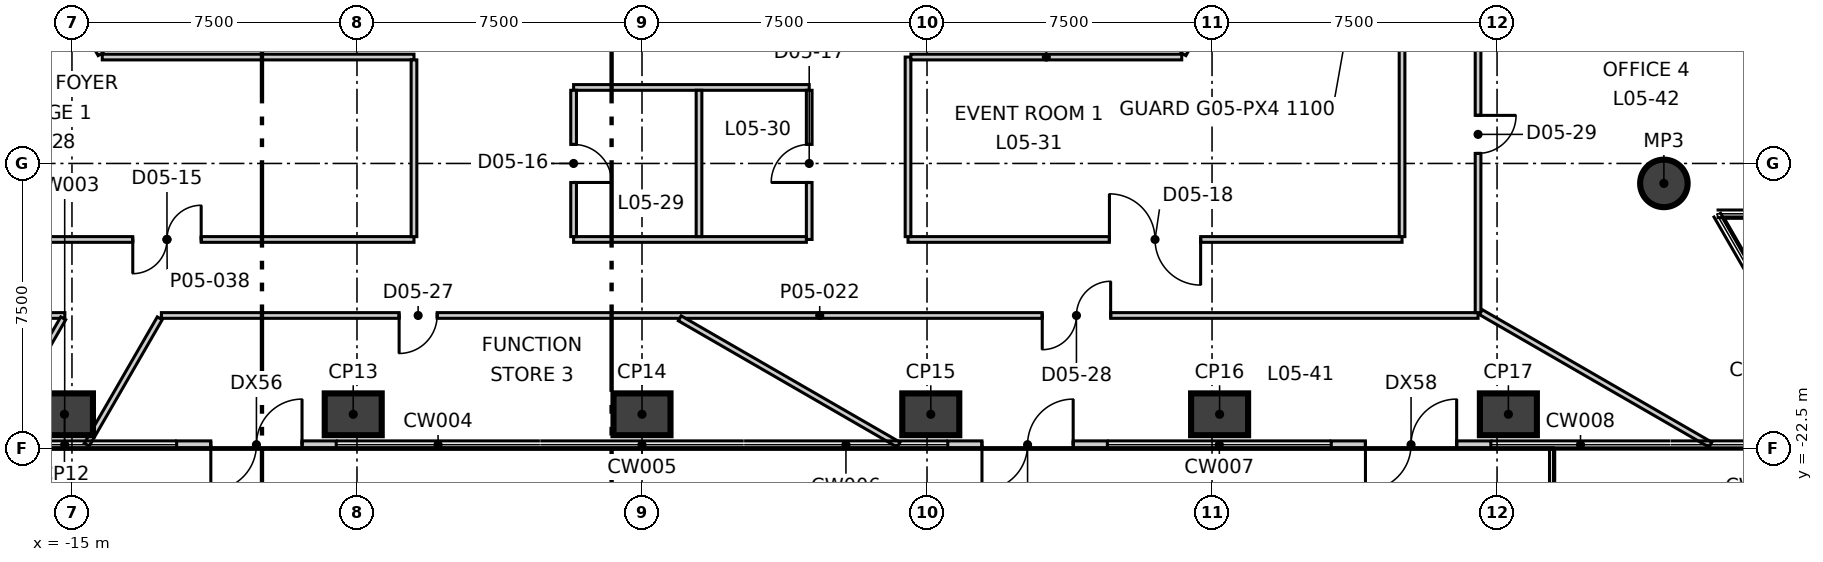
"""IFC4 building model, lengths in metres.
Left out: names, types, materials, properties, quantities, classifications, styles, units other than length and angle.
Written with IfcOpenShell. Run it as: python <this file> out.ifc"""

import sys

from ifc_helpers import new_model, si_unit, direction, frame, frame_2d, origin, origin_2d, place, context, subcontext, project, spatial, rectangle, circle, extrude, element, fill, save


model = new_model("IFC4")
c1 = context("Model", 3, precision=1e-05, world=origin(), true_north=direction((0.0, 1.0)))
c2 = subcontext(c1, "Body", "Model", "MODEL_VIEW")
j1 = project(units=[si_unit("LENGTHUNIT", "METRE"), si_unit("PLANEANGLEUNIT", "RADIAN")], contexts=[c1])
p1 = place(None, origin())
s1 = spatial("IfcSite", under=j1, at=p1, CompositionType="ELEMENT")
p2 = place(p1, origin())
s2 = spatial("IfcBuilding", under=s1, at=p2, CompositionType="ELEMENT")
p3 = place(p2, frame((0.0, 0.0, 30.3)))
s3 = spatial("IfcBuildingStorey", under=s2, at=p3, CompositionType="ELEMENT", Elevation=30.3)
for number, where, z_axis, x_axis in (
    (1, (-15.198, -21.6, -0.4), (0.0, 0.0, 1.0), (1.0, 0.0, 0.0)),
    (2, (-7.599, -21.6, -0.4), (0.0, 0.0, 1.0), (1.0, 0.0, 0.0)),
    (3, (0.0, -21.6, -0.4), (0.0, 0.0, 1.0), (1.0, 0.0, 0.0)),
    (4, (7.599, -21.6, -0.4), (0.0, 0.0, 1.0), (1.0, 0.0, 0.0)),
    (5, (15.199, -21.6, -0.4), (0.0, 0.0, 1.0), (1.0, 0.0, 0.0)),
    (6, (22.798, -21.6, -0.4), (0.0, 0.0, 1.0), (1.0, 0.0, 0.0)),
):
    element("IfcColumn", number, at=place(p3, frame(where, z_axis=z_axis, x_axis=x_axis)), inside=s3, PredefinedType="COLUMN", context=c2, shape_type="SweptSolid", body=[
        extrude(rectangle(XDim=1.5, YDim=1.1, at=origin_2d()), origin(), (0.0, 0.0, 1.0), 5.1),
    ])
p4 = place(p3, frame((26.89, -15.525, -0.4), z_axis=(0.0, 0.0, 1.0), x_axis=(1.0, 0.0, 0.0)))
e7 = element("IfcColumn", 7, at=p4, inside=s3, PredefinedType="COLUMN", context=c2, shape_type="SweptSolid", body=[
    extrude(circle(Radius=0.625, at=origin_2d()), origin(), (0.0, 0.0, 1.0), 5.1),
])
p5 = place(p3, frame((-12.246, -22.4, 0.0), z_axis=(0.0, 0.0, 1.0), x_axis=(1.0, 0.0, 0.0)))
e8 = element("IfcWall", 8, at=p5, inside=s3, PredefinedType="ELEMENTEDWALL", context=c2, shape_type="SweptSolid", body=[
    extrude(rectangle(XDim=4.2, YDim=0.2, at=frame_2d((2.1, 0.0))), origin(), (0.0, 0.0, 1.0), 4.7),
])
p6 = place(p5, frame((0.9, 0.0, 0.0)))
e9 = element("IfcOpeningElement", 9, at=p6, cuts=e8, PredefinedType="OPENING", context=c2, shape_type="SweptSolid", body=[
    extrude(rectangle(XDim=2.4, YDim=2.4, at=frame_2d((1.2, 1.2))), frame((0.0, 0.11, 0.0), z_axis=(0.0, -1.0, 0.0), x_axis=(1.0, 0.0, 0.0)), (0.0, 0.0, 1.0), 0.22),
])
p7 = place(p3, frame((8.046, -22.4, 0.0), z_axis=(0.0, 0.0, 1.0), x_axis=(1.0, 0.0, 0.0)))
e10 = element("IfcWall", 10, at=p7, inside=s3, PredefinedType="ELEMENTEDWALL", context=c2, shape_type="SweptSolid", body=[
    extrude(rectangle(XDim=4.2, YDim=0.2, at=frame_2d((2.1, 0.0))), origin(), (0.0, 0.0, 1.0), 4.7),
])
p8 = place(p7, frame((0.9, 0.0, 0.0)))
e11 = element("IfcOpeningElement", 11, at=p8, cuts=e10, PredefinedType="OPENING", context=c2, shape_type="SweptSolid", body=[
    extrude(rectangle(XDim=2.4, YDim=2.4, at=frame_2d((1.2, 1.2))), frame((0.0, 0.11, 0.0), z_axis=(0.0, -1.0, 0.0), x_axis=(1.0, 0.0, 0.0)), (0.0, 0.0, 1.0), 0.22),
])
p9 = place(p3, frame((18.137, -22.4, 0.0), z_axis=(0.0, 0.0, 1.0), x_axis=(1.0, 0.0, 0.0)))
e12 = element("IfcWall", 12, at=p9, inside=s3, PredefinedType="ELEMENTEDWALL", context=c2, shape_type="SweptSolid", body=[
    extrude(rectangle(XDim=4.2, YDim=0.2, at=frame_2d((2.1, 0.0))), origin(), (0.0, 0.0, 1.0), 4.7),
])
p10 = place(p9, frame((0.9, 0.0, 0.0)))
e13 = element("IfcOpeningElement", 13, at=p10, cuts=e12, PredefinedType="OPENING", context=c2, shape_type="SweptSolid", body=[
    extrude(rectangle(XDim=2.4, YDim=2.4, at=frame_2d((1.2, 1.2))), frame((0.0, 0.11, 0.0), z_axis=(0.0, -1.0, 0.0), x_axis=(1.0, 0.0, 0.0)), (0.0, 0.0, 1.0), 0.22),
])
p11 = place(p3, frame((-20.925, -19.0, 0.0), z_axis=(0.0, 0.0, 1.0), x_axis=(1.0, 0.0, 0.0)))
e14 = element("IfcWall", 14, at=p11, inside=s3, PredefinedType="PARTITIONING", context=c2, shape_type="SweptSolid", body=[
    extrude(rectangle(XDim=5.738, YDim=0.15, at=frame_2d((2.869, 0.0))), origin(), (0.0, 0.0, 1.0), 4.7),
])
p12 = place(p3, frame((-12.647, -19.0, 0.0), z_axis=(0.0, 0.0, 1.0), x_axis=(1.0, 0.0, 0.0)))
e15 = element("IfcWall", 15, at=p12, inside=s3, PredefinedType="PARTITIONING", context=c2, shape_type="SweptSolid", body=[
    extrude(rectangle(XDim=34.647, YDim=0.15, at=frame_2d((17.323, 0.0))), origin(), (0.0, 0.0, 1.0), 4.7),
])
p13 = place(p12, frame((6.256, 0.0, 0.0)))
e16 = element("IfcOpeningElement", 16, at=p13, cuts=e15, PredefinedType="OPENING", context=c2, shape_type="SweptSolid", body=[
    extrude(rectangle(XDim=1.0, YDim=2.1, at=frame_2d((0.5, 1.05))), frame((0.0, 0.085, 0.0), z_axis=(0.0, -1.0, 0.0), x_axis=(1.0, 0.0, 0.0)), (0.0, 0.0, 1.0), 0.17),
])
p14 = place(p12, frame((23.179, 0.0, 0.0)))
e17 = element("IfcOpeningElement", 17, at=p14, cuts=e15, PredefinedType="OPENING", context=c2, shape_type="SweptSolid", body=[
    extrude(rectangle(XDim=1.8, YDim=2.1, at=frame_2d((0.9, 1.05))), frame((0.0, 0.085, 0.0), z_axis=(0.0, -1.0, 0.0), x_axis=(1.0, 0.0, 0.0)), (0.0, 0.0, 1.0), 0.17),
])
p15 = place(p3, frame((-17.15, -22.4, 0.0), z_axis=(0.0, 0.0, 1.0), x_axis=(0.500050869834, 0.86599603208, 0.0)))
e18 = element("IfcWall", 18, at=p15, inside=s3, PredefinedType="PARTITIONING", context=c2, shape_type="SweptSolid", body=[
    extrude(rectangle(XDim=3.839, YDim=0.15, at=frame_2d((1.92, 0.0))), origin(), (0.0, 0.0, 1.0), 4.7),
])
p16 = place(p3, frame((-14.61, -22.4, 0.0), z_axis=(0.0, 0.0, 1.0), x_axis=(0.500098554833, 0.865968495648, 0.0)))
e19 = element("IfcWall", 19, at=p16, inside=s3, PredefinedType="PARTITIONING", context=c2, shape_type="SweptSolid", body=[
    extrude(rectangle(XDim=3.84, YDim=0.15, at=frame_2d((1.92, 0.0))), origin(), (0.0, 0.0, 1.0), 4.7),
])
p17 = place(p3, frame((22.0, -18.925, 0.0), z_axis=(0.0, 0.0, 1.0), x_axis=(0.0, 1.0, 0.0)))
e20 = element("IfcWall", 20, at=p17, inside=s3, PredefinedType="PARTITIONING", context=c2, shape_type="SweptSolid", body=[
    extrude(rectangle(XDim=9.325, YDim=0.15, at=frame_2d((4.663, 0.0))), origin(), (0.0, 0.0, 1.0), 4.7),
])
p18 = place(p17, frame((4.19, 0.0, 0.0)))
e21 = element("IfcOpeningElement", 21, at=p18, cuts=e20, PredefinedType="OPENING", context=c2, shape_type="SweptSolid", body=[
    extrude(rectangle(XDim=1.0, YDim=2.1, at=frame_2d((0.5, 1.05))), frame((0.0, 0.085, 0.0), z_axis=(0.0, -1.0, 0.0), x_axis=(1.0, 0.0, 0.0)), (0.0, 0.0, 1.0), 0.17),
])
p19 = place(p3, frame((0.994, -19.075, 0.0), z_axis=(0.0, 0.0, 1.0), x_axis=(0.866027239912, -0.49999681972, 0.0)))
e22 = element("IfcWall", 22, at=p19, inside=s3, PredefinedType="PARTITIONING", context=c2, shape_type="SweptSolid", body=[
    extrude(rectangle(XDim=6.65, YDim=0.15, at=frame_2d((3.325, 0.0))), origin(), (0.0, 0.0, 1.0), 4.7),
])
p20 = place(p3, frame((-1.8, -13.0, 0.0), z_axis=(0.0, 0.0, 1.0), x_axis=(1.0, 0.0, 0.0)))
e23 = element("IfcWall", 23, at=p20, inside=s3, PredefinedType="PARTITIONING", context=c2, shape_type="SweptSolid", body=[
    extrude(rectangle(XDim=6.2, YDim=0.15, at=frame_2d((3.1, 0.0))), origin(), (0.0, 0.0, 1.0), 4.7),
])
p21 = place(p3, frame((4.4, -17.0, 0.0), z_axis=(0.0, 0.0, 1.0), x_axis=(0.0, 1.0, 0.0)))
e24 = element("IfcWall", 24, at=p21, inside=s3, PredefinedType="PARTITIONING", context=c2, shape_type="SweptSolid", body=[
    extrude(rectangle(XDim=3.925, YDim=0.15, at=frame_2d((1.962, 0.0))), origin(), (0.0, 0.0, 1.0), 4.7),
])
p22 = place(p21, frame((1.5, 0.0, 0.0)))
e25 = element("IfcOpeningElement", 25, at=p22, cuts=e24, PredefinedType="OPENING", context=c2, shape_type="SweptSolid", body=[
    extrude(rectangle(XDim=1.0, YDim=2.1, at=frame_2d((0.5, 1.05))), frame((0.0, 0.085, 0.0), z_axis=(0.0, -1.0, 0.0), x_axis=(1.0, 0.0, 0.0)), (0.0, 0.0, 1.0), 0.17),
])
p23 = place(p3, frame((-19.0, -17.0, 0.0), z_axis=(0.0, 0.0, 1.0), x_axis=(1.0, 0.0, 0.0)))
e26 = element("IfcWall", 26, at=p23, inside=s3, PredefinedType="PARTITIONING", context=c2, shape_type="SweptSolid", body=[
    extrude(rectangle(XDim=13.0, YDim=0.15, at=frame_2d((6.5, 0.0))), origin(), (0.0, 0.0, 1.0), 4.7),
])
p24 = place(p23, frame((5.6, 0.0, 0.0)))
e27 = element("IfcOpeningElement", 27, at=p24, cuts=e26, PredefinedType="OPENING", context=c2, shape_type="SweptSolid", body=[
    extrude(rectangle(XDim=1.8, YDim=2.1, at=frame_2d((0.9, 1.05))), frame((0.0, 0.085, 0.0), z_axis=(0.0, -1.0, 0.0), x_axis=(1.0, 0.0, 0.0)), (0.0, 0.0, 1.0), 0.17),
])
p25 = place(p3, frame((-1.8, -17.0, 0.0), z_axis=(0.0, 0.0, 1.0), x_axis=(1.0, 0.0, 0.0)))
e28 = element("IfcWall", 28, at=p25, inside=s3, PredefinedType="PARTITIONING", context=c2, shape_type="SweptSolid", body=[
    extrude(rectangle(XDim=6.125, YDim=0.15, at=frame_2d((3.062, 0.0))), origin(), (0.0, 0.0, 1.0), 4.7),
])
p26 = place(p3, frame((7.0, -17.0, 0.0), z_axis=(0.0, 0.0, 1.0), x_axis=(1.0, 0.0, 0.0)))
e29 = element("IfcWall", 29, at=p26, inside=s3, PredefinedType="PARTITIONING", context=c2, shape_type="SweptSolid", body=[
    extrude(rectangle(XDim=13.0, YDim=0.15, at=frame_2d((6.5, 0.0))), origin(), (0.0, 0.0, 1.0), 4.7),
])
p27 = place(p26, frame((5.3, 0.0, 0.0)))
e30 = element("IfcOpeningElement", 30, at=p27, cuts=e29, PredefinedType="OPENING", context=c2, shape_type="SweptSolid", body=[
    extrude(rectangle(XDim=2.4, YDim=2.1, at=frame_2d((1.2, 1.05))), frame((0.0, 0.085, 0.0), z_axis=(0.0, -1.0, 0.0), x_axis=(1.0, 0.0, 0.0)), (0.0, 0.0, 1.0), 0.17),
])
p28 = place(p3, frame((1.5, -16.925, 0.0), z_axis=(0.0, 0.0, 1.0), x_axis=(0.0, 1.0, 0.0)))
e31 = element("IfcWall", 31, at=p28, inside=s3, PredefinedType="PARTITIONING", context=c2, shape_type="SweptSolid", body=[
    extrude(rectangle(XDim=3.85, YDim=0.15, at=frame_2d((1.925, 0.0))), origin(), (0.0, 0.0, 1.0), 4.7),
])
p29 = place(p3, frame((-1.8, -16.925, 0.0), z_axis=(0.0, 0.0, 1.0), x_axis=(0.0, 1.0, 0.0)))
e32 = element("IfcWall", 32, at=p29, inside=s3, PredefinedType="PARTITIONING", context=c2, shape_type="SweptSolid", body=[
    extrude(rectangle(XDim=3.85, YDim=0.15, at=frame_2d((1.925, 0.0))), origin(), (0.0, 0.0, 1.0), 4.7),
])
p30 = place(p29, frame((1.425, 0.0, 0.0)))
e33 = element("IfcOpeningElement", 33, at=p30, cuts=e32, PredefinedType="OPENING", context=c2, shape_type="SweptSolid", body=[
    extrude(rectangle(XDim=1.0, YDim=2.1, at=frame_2d((0.5, 1.05))), frame((0.0, 0.085, 0.0), z_axis=(0.0, -1.0, 0.0), x_axis=(1.0, 0.0, 0.0)), (0.0, 0.0, 1.0), 0.17),
])
p31 = place(p3, frame((20.0, -16.925, 0.0), z_axis=(0.0, 0.0, 1.0), x_axis=(0.0, 1.0, 0.0)))
e34 = element("IfcWall", 34, at=p31, inside=s3, PredefinedType="PARTITIONING", context=c2, shape_type="SweptSolid", body=[
    extrude(rectangle(XDim=9.225, YDim=0.15, at=frame_2d((4.613, 0.0))), origin(), (0.0, 0.0, 1.0), 4.7),
])
p32 = place(p3, frame((7.0, -16.925, 0.0), z_axis=(0.0, 0.0, 1.0), x_axis=(0.0, 1.0, 0.0)))
e35 = element("IfcWall", 35, at=p32, inside=s3, PredefinedType="PARTITIONING", context=c2, shape_type="SweptSolid", body=[
    extrude(rectangle(XDim=4.725, YDim=0.15, at=frame_2d((2.363, 0.0))), origin(), (0.0, 0.0, 1.0), 4.7),
])
p33 = place(p3, frame((-14.203, -12.2, 0.0), z_axis=(0.0, 0.0, 1.0), x_axis=(1.0, 0.0, 0.0)))
e36 = element("IfcWall", 36, at=p33, inside=s3, PredefinedType="PARTITIONING", context=c2, shape_type="SweptSolid", body=[
    extrude(rectangle(XDim=8.203, YDim=0.15, at=frame_2d((4.102, 0.0))), origin(), (0.0, 0.0, 1.0), 4.7),
])
p34 = place(p3, frame((7.075, -12.2, 0.0), z_axis=(0.0, 0.0, 1.0), x_axis=(1.0, 0.0, 0.0)))
e37 = element("IfcWall", 37, at=p34, inside=s3, PredefinedType="PARTITIONING", context=c2, shape_type="SweptSolid", body=[
    extrude(rectangle(XDim=7.128, YDim=0.15, at=frame_2d((3.564, 0.0))), origin(), (0.0, 0.0, 1.0), 4.7),
])
p35 = place(p3, frame((14.246, -12.125, 0.0), z_axis=(0.0, 0.0, 1.0), x_axis=(0.500018862428, 0.866014513283, 0.0)))
e38 = element("IfcWall", 38, at=p35, inside=s3, PredefinedType="PARTITIONING", context=c2, shape_type="SweptSolid", body=[
    extrude(rectangle(XDim=5.11, YDim=0.15, at=frame_2d((2.555, 0.0))), origin(), (0.0, 0.0, 1.0), 4.7),
])
p36 = place(p3, frame((22.075, -18.913, 0.0), z_axis=(0.0, 0.0, 1.0), x_axis=(0.866050347742, -0.499956793309, 0.0)))
e39 = element("IfcWall", 39, at=p36, inside=s3, PredefinedType="PARTITIONING", context=c2, shape_type="SweptSolid", body=[
    extrude(rectangle(XDim=6.974, YDim=0.15, at=frame_2d((3.487, 0.0))), origin(), (0.0, 0.0, 1.0), 4.7),
])
p37 = place(p3, frame((24.975, -8.253, 0.0), z_axis=(0.0, 0.0, 1.0), x_axis=(0.866010428405, -0.500025937221, 0.0)))
e40 = element("IfcWall", 40, at=p37, inside=s3, PredefinedType="PARTITIONING", context=c2, shape_type="SweptSolid", body=[
    extrude(rectangle(XDim=9.795, YDim=0.15, at=frame_2d((4.898, 0.0))), origin(), (0.0, 0.0, 1.0), 4.7),
])
p38 = place(p3, frame((-16.007, -9.075, 0.0), z_axis=(0.0, 0.0, 1.0), x_axis=(0.500008478926, -0.866020508419, 0.0)))
e41 = element("IfcWall", 41, at=p38, inside=s3, PredefinedType="PARTITIONING", context=c2, shape_type="SweptSolid", body=[
    extrude(rectangle(XDim=3.522, YDim=0.15, at=frame_2d((1.761, 0.0))), origin(), (0.0, 0.0, 1.0), 4.7),
])
p39 = place(p3, frame((-6.0, -16.925, 0.0), z_axis=(0.0, 0.0, 1.0), x_axis=(0.0, 1.0, 0.0)))
e42 = element("IfcWall", 42, at=p39, inside=s3, PredefinedType="PARTITIONING", context=c2, shape_type="SweptSolid", body=[
    extrude(rectangle(XDim=4.65, YDim=0.15, at=frame_2d((2.325, 0.0))), origin(), (0.0, 0.0, 1.0), 4.7),
])
p40 = place(p6, frame((2.4, 0.0, 0.0), z_axis=(0.0, 0.0, 1.0), x_axis=(-1.0, 0.0, 0.0)))
e43 = element("IfcDoor", 43, at=p40, inside=s3, OperationType="DOUBLE_DOOR_SINGLE_SWING", PredefinedType="DOOR", context=c2, shape_type="SweptSolid", body=[
    extrude(rectangle(XDim=2.4, YDim=2.4, at=frame_2d((1.2, 1.2))), frame((0.0, 0.025, 0.0), z_axis=(0.0, -1.0, 0.0), x_axis=(1.0, 0.0, 0.0)), (0.0, 0.0, 1.0), 0.05),
])
fill(e9, e43)
p41 = place(p8, frame((2.4, 0.0, 0.0), z_axis=(0.0, 0.0, 1.0), x_axis=(-1.0, 0.0, 0.0)))
e44 = element("IfcDoor", 44, at=p41, inside=s3, OperationType="DOUBLE_DOOR_SINGLE_SWING", PredefinedType="DOOR", context=c2, shape_type="SweptSolid", body=[
    extrude(rectangle(XDim=2.4, YDim=2.4, at=frame_2d((1.2, 1.2))), frame((0.0, 0.025, 0.0), z_axis=(0.0, -1.0, 0.0), x_axis=(1.0, 0.0, 0.0)), (0.0, 0.0, 1.0), 0.05),
])
fill(e11, e44)
p42 = place(p10, frame((2.4, 0.0, 0.0), z_axis=(0.0, 0.0, 1.0), x_axis=(-1.0, 0.0, 0.0)))
e45 = element("IfcDoor", 45, at=p42, inside=s3, OperationType="DOUBLE_DOOR_SINGLE_SWING", PredefinedType="DOOR", context=c2, shape_type="SweptSolid", body=[
    extrude(rectangle(XDim=2.4, YDim=2.4, at=frame_2d((1.2, 1.2))), frame((0.0, 0.025, 0.0), z_axis=(0.0, -1.0, 0.0), x_axis=(1.0, 0.0, 0.0)), (0.0, 0.0, 1.0), 0.05),
])
fill(e13, e45)
p43 = place(p24, origin())
e46 = element("IfcDoor", 46, at=p43, inside=s3, OperationType="DOUBLE_DOOR_SINGLE_SWING", PredefinedType="DOOR", context=c2, shape_type="SweptSolid", body=[
    extrude(rectangle(XDim=1.8, YDim=2.1, at=frame_2d((0.9, 1.05))), frame((0.0, 0.025, 0.0), z_axis=(0.0, -1.0, 0.0), x_axis=(1.0, 0.0, 0.0)), (0.0, 0.0, 1.0), 0.05),
])
fill(e27, e46)
p44 = place(p30, origin())
e47 = element("IfcDoor", 47, at=p44, inside=s3, OperationType="SINGLE_SWING_LEFT", PredefinedType="DOOR", context=c2, shape_type="SweptSolid", body=[
    extrude(rectangle(XDim=1.0, YDim=2.1, at=frame_2d((0.5, 1.05))), frame((0.0, 0.025, 0.0), z_axis=(0.0, -1.0, 0.0), x_axis=(1.0, 0.0, 0.0)), (0.0, 0.0, 1.0), 0.05),
])
fill(e33, e47)
p45 = place(p22, origin())
e48 = element("IfcDoor", 48, at=p45, inside=s3, OperationType="SINGLE_SWING_RIGHT", PredefinedType="DOOR", context=c2, shape_type="SweptSolid", body=[
    extrude(rectangle(XDim=1.0, YDim=2.1, at=frame_2d((0.5, 1.05))), frame((0.0, 0.025, 0.0), z_axis=(0.0, -1.0, 0.0), x_axis=(1.0, 0.0, 0.0)), (0.0, 0.0, 1.0), 0.05),
])
fill(e25, e48)
p46 = place(p27, origin())
e49 = element("IfcDoor", 49, at=p46, inside=s3, OperationType="DOUBLE_DOOR_SINGLE_SWING", PredefinedType="DOOR", context=c2, shape_type="SweptSolid", body=[
    extrude(rectangle(XDim=2.4, YDim=2.1, at=frame_2d((1.2, 1.05))), frame((0.0, 0.025, 0.0), z_axis=(0.0, -1.0, 0.0), x_axis=(1.0, 0.0, 0.0)), (0.0, 0.0, 1.0), 0.05),
])
fill(e30, e49)
p47 = place(p13, origin())
e50 = element("IfcDoor", 50, at=p47, inside=s3, OperationType="SINGLE_SWING_LEFT", PredefinedType="DOOR", context=c2, shape_type="SweptSolid", body=[
    extrude(rectangle(XDim=1.0, YDim=2.1, at=frame_2d((0.5, 1.05))), frame((0.0, 0.025, 0.0), z_axis=(0.0, -1.0, 0.0), x_axis=(1.0, 0.0, 0.0)), (0.0, 0.0, 1.0), 0.05),
])
fill(e16, e50)
p48 = place(p14, origin())
e51 = element("IfcDoor", 51, at=p48, inside=s3, OperationType="DOUBLE_DOOR_SINGLE_SWING", PredefinedType="DOOR", context=c2, shape_type="SweptSolid", body=[
    extrude(rectangle(XDim=1.8, YDim=2.1, at=frame_2d((0.9, 1.05))), frame((0.0, 0.025, 0.0), z_axis=(0.0, -1.0, 0.0), x_axis=(1.0, 0.0, 0.0)), (0.0, 0.0, 1.0), 0.05),
])
fill(e17, e51)
p49 = place(p18, origin())
e52 = element("IfcDoor", 52, at=p49, inside=s3, OperationType="SINGLE_SWING_RIGHT", PredefinedType="DOOR", context=c2, shape_type="SweptSolid", body=[
    extrude(rectangle(XDim=1.0, YDim=2.1, at=frame_2d((0.5, 1.05))), frame((0.0, 0.025, 0.0), z_axis=(0.0, -1.0, 0.0), x_axis=(1.0, 0.0, 0.0)), (0.0, 0.0, 1.0), 0.05),
])
fill(e21, e52)
save(model, sys.argv[1])
